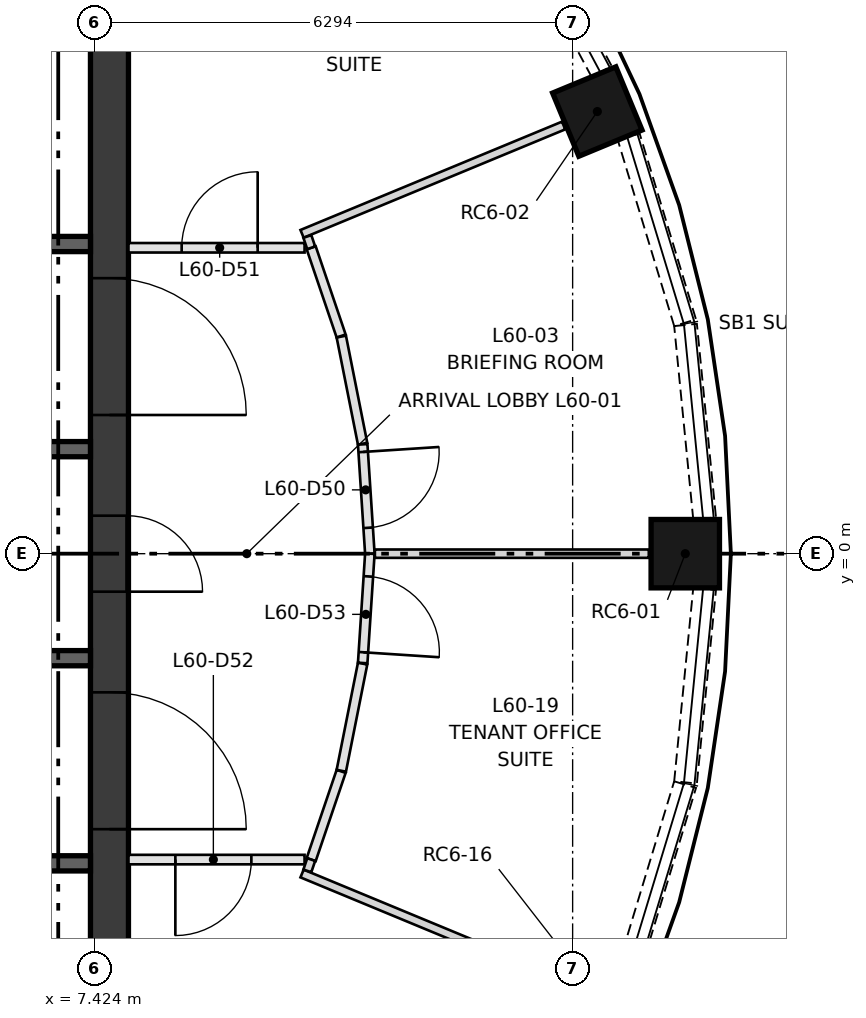
"""IFC4 building model, lengths in metres.
Left out: names, types, materials, properties, quantities, classifications, styles, units other than length and angle.
Written with IfcOpenShell. Run it as: python <this file> out.ifc"""

import sys

from ifc_helpers import new_model, si_unit, direction, frame, frame_2d, origin, origin_2d, place, context, subcontext, project, spatial, rectangle, extrude, element, fill, save


model = new_model("IFC4")
c1 = context("Model", 3, precision=1e-05, world=origin(), true_north=direction((0.0, 1.0)))
c2 = subcontext(c1, "Body", "Model", "MODEL_VIEW")
j1 = project(units=[si_unit("LENGTHUNIT", "METRE"), si_unit("PLANEANGLEUNIT", "RADIAN")], contexts=[c1])
p1 = place(None, origin())
s1 = spatial("IfcSite", under=j1, at=p1, CompositionType="ELEMENT")
p2 = place(p1, origin())
s2 = spatial("IfcBuilding", under=s1, at=p2, CompositionType="ELEMENT")
p3 = place(p2, frame((0.0, 0.0, 221.15)))
s3 = spatial("IfcBuildingStorey", under=s2, at=p3, CompositionType="ELEMENT", Elevation=221.15)
for number, where, z_axis, x_axis in (
    (1, (15.2, 0.0, 0.0), (0.0, 0.0, 1.0), (1.0, 0.0, 0.0)),
    (2, (14.043, 5.817, 0.0), (0.0, 0.0, 1.0), (0.924, 0.383, 0.0)),
):
    element("IfcColumn", number, at=place(p3, frame(where, z_axis=z_axis, x_axis=x_axis)), inside=s3, PredefinedType="COLUMN", context=c2, shape_type="SweptSolid", body=[
        extrude(rectangle(XDim=0.9, YDim=0.9, at=origin_2d()), origin(), (0.0, 0.0, 1.0), 2.85),
    ])
p4 = place(p3, frame((7.624, -7.374, 0.0), z_axis=(0.0, 0.0, 1.0), x_axis=(0.0, 1.0, 0.0)))
e3 = element("IfcWall", 3, at=p4, inside=s3, PredefinedType="SHEAR", context=c2, shape_type="SweptSolid", body=[
    extrude(rectangle(XDim=14.748, YDim=0.5, at=frame_2d((7.374, 0.0))), origin(), (0.0, 0.0, 1.0), 3.35),
])
p5 = place(p4, frame((6.874, 0.0, 0.0)))
e4 = element("IfcOpeningElement", 4, at=p5, cuts=e3, PredefinedType="OPENING", context=c2, shape_type="SweptSolid", body=[
    extrude(rectangle(XDim=1.0, YDim=2.1, at=frame_2d((0.5, 1.05))), frame((0.0, 0.26, 0.0), z_axis=(0.0, -1.0, 0.0), x_axis=(1.0, 0.0, 0.0)), (0.0, 0.0, 1.0), 0.52),
])
p6 = place(p4, frame((3.75, 0.0, 0.0)))
e5 = element("IfcOpeningElement", 5, at=p6, cuts=e3, PredefinedType="OPENING", context=c2, shape_type="SweptSolid", body=[
    extrude(rectangle(XDim=1.8, YDim=2.1, at=frame_2d((0.9, 1.05))), frame((0.0, 0.26, 0.0), z_axis=(0.0, -1.0, 0.0), x_axis=(1.0, 0.0, 0.0)), (0.0, 0.0, 1.0), 0.52),
])
p7 = place(p4, frame((9.198, 0.0, 0.0)))
e6 = element("IfcOpeningElement", 6, at=p7, cuts=e3, PredefinedType="OPENING", context=c2, shape_type="SweptSolid", body=[
    extrude(rectangle(XDim=1.8, YDim=2.1, at=frame_2d((0.9, 1.05))), frame((0.0, 0.26, 0.0), z_axis=(0.0, -1.0, 0.0), x_axis=(1.0, 0.0, 0.0)), (0.0, 0.0, 1.0), 0.52),
])
p8 = place(p3, frame((-7.374, -4.074, 0.0), z_axis=(0.0, 0.0, 1.0), x_axis=(1.0, 0.0, 0.0)))
e7 = element("IfcWall", 7, at=p8, inside=s3, PredefinedType="SHEAR", context=c2, shape_type="SweptSolid", body=[
    extrude(rectangle(XDim=14.748, YDim=0.2, at=frame_2d((7.374, 0.0))), origin(), (0.0, 0.0, 1.0), 3.0),
])
p9 = place(p8, frame((1.319, 0.0, 0.0)))
e8 = element("IfcOpeningElement", 8, at=p9, cuts=e7, PredefinedType="OPENING", context=c2, shape_type="SweptSolid", body=[
    extrude(rectangle(XDim=1.1, YDim=2.1, at=frame_2d((0.55, 1.05))), frame((0.0, 0.11, 0.0), z_axis=(0.0, -1.0, 0.0), x_axis=(1.0, 0.0, 0.0)), (0.0, 0.0, 1.0), 0.22),
])
p10 = place(p8, frame((4.456, 0.0, 0.0)))
e9 = element("IfcOpeningElement", 9, at=p10, cuts=e7, PredefinedType="OPENING", context=c2, shape_type="SweptSolid", body=[
    extrude(rectangle(XDim=1.1, YDim=2.1, at=frame_2d((0.55, 1.05))), frame((0.0, 0.11, 0.0), z_axis=(0.0, -1.0, 0.0), x_axis=(1.0, 0.0, 0.0)), (0.0, 0.0, 1.0), 0.22),
])
p11 = place(p8, frame((8.143, 0.0, 0.0)))
e10 = element("IfcOpeningElement", 10, at=p11, cuts=e7, PredefinedType="OPENING", context=c2, shape_type="SweptSolid", body=[
    extrude(rectangle(XDim=1.0, YDim=2.1, at=frame_2d((0.5, 1.05))), frame((0.0, 0.11, 0.0), z_axis=(0.0, -1.0, 0.0), x_axis=(1.0, 0.0, 0.0)), (0.0, 0.0, 1.0), 0.22),
])
p12 = place(p8, frame((12.379, 0.0, 0.0)))
e11 = element("IfcOpeningElement", 11, at=p12, cuts=e7, PredefinedType="OPENING", context=c2, shape_type="SweptSolid", body=[
    extrude(rectangle(XDim=0.8, YDim=2.1, at=frame_2d((0.4, 1.05))), frame((0.0, 0.11, 0.0), z_axis=(0.0, -1.0, 0.0), x_axis=(1.0, 0.0, 0.0)), (0.0, 0.0, 1.0), 0.22),
])
p13 = place(p3, frame((0.0, 4.074, 0.0), z_axis=(0.0, 0.0, 1.0), x_axis=(1.0, 0.0, 0.0)))
e12 = element("IfcWall", 12, at=p13, inside=s3, PredefinedType="SHEAR", context=c2, shape_type="SweptSolid", body=[
    extrude(rectangle(XDim=7.374, YDim=0.2, at=frame_2d((3.687, 0.0))), origin(), (0.0, 0.0, 1.0), 3.0),
])
p14 = place(p13, frame((0.384, 0.0, 0.0)))
e13 = element("IfcOpeningElement", 13, at=p14, cuts=e12, PredefinedType="OPENING", context=c2, shape_type="SweptSolid", body=[
    extrude(rectangle(XDim=1.0, YDim=2.1, at=frame_2d((0.5, 1.05))), frame((0.0, 0.11, 0.0), z_axis=(0.0, -1.0, 0.0), x_axis=(1.0, 0.0, 0.0)), (0.0, 0.0, 1.0), 0.22),
])
p15 = place(p13, frame((2.153, 0.0, 0.0)))
e14 = element("IfcOpeningElement", 14, at=p15, cuts=e12, PredefinedType="OPENING", context=c2, shape_type="SweptSolid", body=[
    extrude(rectangle(XDim=1.0, YDim=2.1, at=frame_2d((0.5, 1.05))), frame((0.0, 0.11, 0.0), z_axis=(0.0, -1.0, 0.0), x_axis=(1.0, 0.0, 0.0)), (0.0, 0.0, 1.0), 0.22),
])
p16 = place(p13, frame((3.921, 0.0, 0.0)))
e15 = element("IfcOpeningElement", 15, at=p16, cuts=e12, PredefinedType="OPENING", context=c2, shape_type="SweptSolid", body=[
    extrude(rectangle(XDim=1.0, YDim=2.1, at=frame_2d((0.5, 1.05))), frame((0.0, 0.11, 0.0), z_axis=(0.0, -1.0, 0.0), x_axis=(1.0, 0.0, 0.0)), (0.0, 0.0, 1.0), 0.22),
])
p17 = place(p13, frame((5.79, 0.0, 0.0)))
e16 = element("IfcOpeningElement", 16, at=p17, cuts=e12, PredefinedType="OPENING", context=c2, shape_type="SweptSolid", body=[
    extrude(rectangle(XDim=0.8, YDim=2.1, at=frame_2d((0.4, 1.05))), frame((0.0, 0.11, 0.0), z_axis=(0.0, -1.0, 0.0), x_axis=(1.0, 0.0, 0.0)), (0.0, 0.0, 1.0), 0.22),
])
for number, where, z_axis, x_axis in (
    (17, (4.374, -1.375, 0.0), (0.0, 0.0, 1.0), (1.0, 0.0, 0.0)),
    (18, (4.374, 1.375, 0.0), (0.0, 0.0, 1.0), (1.0, 0.0, 0.0)),
):
    element("IfcWall", number, at=place(p3, frame(where, z_axis=z_axis, x_axis=x_axis)), inside=s3, PredefinedType="SHEAR", context=c2, shape_type="SweptSolid", body=[
        extrude(rectangle(XDim=3.0, YDim=0.2, at=frame_2d((1.5, 0.0))), origin(), (0.0, 0.0, 1.0), 3.0),
    ])
p18 = place(p3, frame((15.455, 0.464, 0.0), z_axis=(0.0, 0.0, 1.0), x_axis=(-0.09813315545, 0.995173293352, 0.0)))
e19 = element("IfcWall", 19, at=p18, inside=s3, PredefinedType="SOLIDWALL", context=c2, shape_type="SweptSolid", body=[
    extrude(rectangle(XDim=2.558, YDim=0.3, at=frame_2d((1.279, 0.0))), origin(), (0.0, 0.0, 1.0), 0.9),
])
p19 = place(p3, frame((15.198, 3.038, 0.0), z_axis=(0.0, 0.0, 1.0), x_axis=(-0.290219358397, 0.956960147557, 0.0)))
e20 = element("IfcWall", 20, at=p19, inside=s3, PredefinedType="SOLIDWALL", context=c2, shape_type="SweptSolid", body=[
    extrude(rectangle(XDim=2.557, YDim=0.3, at=frame_2d((1.279, 0.0))), origin(), (0.0, 0.0, 1.0), 0.9),
])
p20 = place(p3, frame((14.1, 6.343, 0.0), z_axis=(0.0, 0.0, 1.0), x_axis=(-0.471603904468, 0.881810499649, 0.0)))
e21 = element("IfcWall", 21, at=p20, inside=s3, PredefinedType="SOLIDWALL", context=c2, shape_type="SweptSolid", body=[
    extrude(rectangle(XDim=2.557, YDim=0.3, at=frame_2d((1.278, 0.0))), origin(), (0.0, 0.0, 1.0), 0.9),
])
p21 = place(p3, frame((14.455, -5.486, 0.0), z_axis=(0.0, 0.0, 1.0), x_axis=(0.290219358397, 0.956960147557, 0.0)))
e22 = element("IfcWall", 22, at=p21, inside=s3, PredefinedType="SOLIDWALL", context=c2, shape_type="SweptSolid", body=[
    extrude(rectangle(XDim=2.557, YDim=0.3, at=frame_2d((1.279, 0.0))), origin(), (0.0, 0.0, 1.0), 0.9),
])
p22 = place(p3, frame((15.204, -3.009, 0.0), z_axis=(0.0, 0.0, 1.0), x_axis=(0.09813315545, 0.995173293352, 0.0)))
e23 = element("IfcWall", 23, at=p22, inside=s3, PredefinedType="SOLIDWALL", context=c2, shape_type="SweptSolid", body=[
    extrude(rectangle(XDim=2.558, YDim=0.3, at=frame_2d((1.279, 0.0))), origin(), (0.0, 0.0, 1.0), 0.9),
])
p23 = place(p3, frame((10.278, 4.024, 0.0), z_axis=(0.0, 0.0, 1.0), x_axis=(0.321363343769, -0.946955965862, 0.0)))
e24 = element("IfcWall", 24, at=p23, inside=s3, PredefinedType="PARTITIONING", context=c2, shape_type="SweptSolid", body=[
    extrude(rectangle(XDim=1.225, YDim=0.125, at=frame_2d((0.613, 0.0))), origin(), (0.0, 0.0, 1.0), 3.0),
])
p24 = place(p3, frame((10.674, 2.856, 0.0), z_axis=(0.0, 0.0, 1.0), x_axis=(0.195005351681, -0.980802178228, 0.0)))
e25 = element("IfcWall", 25, at=p24, inside=s3, PredefinedType="PARTITIONING", context=c2, shape_type="SweptSolid", body=[
    extrude(rectangle(XDim=1.437, YDim=0.125, at=frame_2d((0.719, 0.0))), origin(), (0.0, 0.0, 1.0), 3.0),
])
p25 = place(p3, frame((10.956, 1.438, 0.0), z_axis=(0.0, 0.0, 1.0), x_axis=(0.065383473363, -0.997860211358, 0.0)))
e26 = element("IfcWall", 26, at=p25, inside=s3, PredefinedType="PARTITIONING", context=c2, shape_type="SweptSolid", body=[
    extrude(rectangle(XDim=1.441, YDim=0.125, at=frame_2d((0.721, 0.0))), origin(), (0.0, 0.0, 1.0), 3.0),
])
p26 = place(p25, frame((0.1, 0.0, 0.0)))
e27 = element("IfcOpeningElement", 27, at=p26, cuts=e26, PredefinedType="OPENING", context=c2, shape_type="SweptSolid", body=[
    extrude(rectangle(XDim=1.0, YDim=2.1, at=frame_2d((0.5, 1.05))), frame((0.0, 0.073, 0.0), z_axis=(0.0, -1.0, 0.0), x_axis=(1.0, 0.0, 0.0)), (0.0, 0.0, 1.0), 0.145),
])
p27 = place(p3, frame((7.874, 4.024, 0.0), z_axis=(0.0, 0.0, 1.0), x_axis=(1.0, 0.0, 0.0)))
e28 = element("IfcWall", 28, at=p27, inside=s3, PredefinedType="PARTITIONING", context=c2, shape_type="SweptSolid", body=[
    extrude(rectangle(XDim=2.317, YDim=0.125, at=frame_2d((1.158, 0.0))), origin(), (0.0, 0.0, 1.0), 3.0),
])
p28 = place(p27, frame((0.7, 0.0, 0.0)))
e29 = element("IfcOpeningElement", 29, at=p28, cuts=e28, PredefinedType="OPENING", context=c2, shape_type="SweptSolid", body=[
    extrude(rectangle(XDim=1.0, YDim=2.1, at=frame_2d((0.5, 1.05))), frame((0.0, 0.073, 0.0), z_axis=(0.0, -1.0, 0.0), x_axis=(1.0, 0.0, 0.0)), (0.0, 0.0, 1.0), 0.145),
])
p29 = place(p3, frame((10.191, -4.024, 0.0), z_axis=(0.0, 0.0, 1.0), x_axis=(-1.0, 0.0, 0.0)))
e30 = element("IfcWall", 30, at=p29, inside=s3, PredefinedType="PARTITIONING", context=c2, shape_type="SweptSolid", body=[
    extrude(rectangle(XDim=2.317, YDim=0.125, at=frame_2d((1.158, 0.0))), origin(), (0.0, 0.0, 1.0), 3.0),
])
p30 = place(p29, frame((0.7, 0.0, 0.0)))
e31 = element("IfcOpeningElement", 31, at=p30, cuts=e30, PredefinedType="OPENING", context=c2, shape_type="SweptSolid", body=[
    extrude(rectangle(XDim=1.0, YDim=2.1, at=frame_2d((0.5, 1.05))), frame((0.0, 0.073, 0.0), z_axis=(0.0, -1.0, 0.0), x_axis=(1.0, 0.0, 0.0)), (0.0, 0.0, 1.0), 0.145),
])
p31 = place(p3, frame((10.672, -2.864, 0.0), z_axis=(0.0, 0.0, 1.0), x_axis=(-0.321363343769, -0.946955965862, 0.0)))
e32 = element("IfcWall", 32, at=p31, inside=s3, PredefinedType="PARTITIONING", context=c2, shape_type="SweptSolid", body=[
    extrude(rectangle(XDim=1.225, YDim=0.125, at=frame_2d((0.613, 0.0))), origin(), (0.0, 0.0, 1.0), 3.0),
])
p32 = place(p3, frame((10.955, -1.446, 0.0), z_axis=(0.0, 0.0, 1.0), x_axis=(-0.195005351681, -0.980802178228, 0.0)))
e33 = element("IfcWall", 33, at=p32, inside=s3, PredefinedType="PARTITIONING", context=c2, shape_type="SweptSolid", body=[
    extrude(rectangle(XDim=1.437, YDim=0.125, at=frame_2d((0.719, 0.0))), origin(), (0.0, 0.0, 1.0), 3.0),
])
p33 = place(p3, frame((11.05, 0.0, 0.0), z_axis=(0.0, 0.0, 1.0), x_axis=(-0.065383473363, -0.997860211358, 0.0)))
e34 = element("IfcWall", 34, at=p33, inside=s3, PredefinedType="PARTITIONING", context=c2, shape_type="SweptSolid", body=[
    extrude(rectangle(XDim=1.441, YDim=0.125, at=frame_2d((0.721, 0.0))), origin(), (0.0, 0.0, 1.0), 3.0),
])
p34 = place(p33, frame((0.3, 0.0, 0.0)))
e35 = element("IfcOpeningElement", 35, at=p34, cuts=e34, PredefinedType="OPENING", context=c2, shape_type="SweptSolid", body=[
    extrude(rectangle(XDim=1.0, YDim=2.1, at=frame_2d((0.5, 1.05))), frame((0.0, 0.073, 0.0), z_axis=(0.0, -1.0, 0.0), x_axis=(1.0, 0.0, 0.0)), (0.0, 0.0, 1.0), 0.145),
])
p35 = place(p3, frame((10.158, 4.208, 0.0), z_axis=(0.0, 0.0, 1.0), x_axis=(0.923897012701, 0.382641228728, 0.0)))
e36 = element("IfcWall", 36, at=p35, inside=s3, PredefinedType="PARTITIONING", context=c2, shape_type="SweptSolid", body=[
    extrude(rectangle(XDim=3.725, YDim=0.11, at=frame_2d((1.862, 0.0))), origin(), (0.0, 0.0, 1.0), 3.0),
])
p36 = place(p3, frame((10.278, 4.024, 0.0), z_axis=(0.0, 0.0, 1.0), x_axis=(-0.321819116975, 0.94680117023, 0.0)))
e37 = element("IfcWall", 37, at=p36, inside=s3, PredefinedType="PARTITIONING", context=c2, shape_type="SweptSolid", body=[
    extrude(rectangle(XDim=0.157, YDim=0.11, at=frame_2d((0.079, 0.0))), origin(), (0.0, 0.0, 1.0), 3.0),
])
p37 = place(p3, frame((14.72, 0.0, 0.0), z_axis=(0.0, 0.0, 1.0), x_axis=(-1.0, 0.0, 0.0)))
e38 = element("IfcWall", 38, at=p37, inside=s3, PredefinedType="PARTITIONING", context=c2, shape_type="SweptSolid", body=[
    extrude(rectangle(XDim=3.604, YDim=0.11, at=frame_2d((1.802, 0.0))), origin(), (0.0, 0.0, 1.0), 3.0),
])
p38 = place(p3, frame((10.158, -4.208, 0.0), z_axis=(0.0, 0.0, 1.0), x_axis=(0.923897012701, -0.382641228728, 0.0)))
e39 = element("IfcWall", 39, at=p38, inside=s3, PredefinedType="PARTITIONING", context=c2, shape_type="SweptSolid", body=[
    extrude(rectangle(XDim=3.725, YDim=0.11, at=frame_2d((1.862, 0.0))), origin(), (0.0, 0.0, 1.0), 3.0),
])
p39 = place(p3, frame((10.278, -4.024, 0.0), z_axis=(0.0, 0.0, 1.0), x_axis=(-0.321819116975, -0.94680117023, 0.0)))
e40 = element("IfcWall", 40, at=p39, inside=s3, PredefinedType="PARTITIONING", context=c2, shape_type="SweptSolid", body=[
    extrude(rectangle(XDim=0.157, YDim=0.11, at=frame_2d((0.079, 0.0))), origin(), (0.0, 0.0, 1.0), 3.0),
])
p40 = place(p5, frame((1.0, 0.0, 0.0), z_axis=(0.0, 0.0, 1.0), x_axis=(-1.0, 0.0, 0.0)))
e41 = element("IfcDoor", 41, at=p40, inside=s3, OperationType="SINGLE_SWING_LEFT", PredefinedType="DOOR", context=c2, shape_type="SweptSolid", body=[
    extrude(rectangle(XDim=1.0, YDim=2.1, at=frame_2d((0.5, 1.05))), frame((0.0, 0.25, 0.0), z_axis=(0.0, -1.0, 0.0), x_axis=(1.0, 0.0, 0.0)), (0.0, 0.0, 1.0), 0.05),
])
fill(e4, e41)
p41 = place(p6, frame((1.8, 0.0, 0.0), z_axis=(0.0, 0.0, 1.0), x_axis=(-1.0, 0.0, 0.0)))
e42 = element("IfcDoor", 42, at=p41, inside=s3, OperationType="DOUBLE_DOOR_SINGLE_SWING", PredefinedType="DOOR", context=c2, shape_type="SweptSolid", body=[
    extrude(rectangle(XDim=1.8, YDim=2.1, at=frame_2d((0.9, 1.05))), frame((0.0, 0.025, 0.0), z_axis=(0.0, -1.0, 0.0), x_axis=(1.0, 0.0, 0.0)), (0.0, 0.0, 1.0), 0.05),
])
fill(e5, e42)
p42 = place(p7, frame((1.8, 0.0, 0.0), z_axis=(0.0, 0.0, 1.0), x_axis=(-1.0, 0.0, 0.0)))
e43 = element("IfcDoor", 43, at=p42, inside=s3, OperationType="DOUBLE_DOOR_SINGLE_SWING", PredefinedType="DOOR", context=c2, shape_type="SweptSolid", body=[
    extrude(rectangle(XDim=1.8, YDim=2.1, at=frame_2d((0.9, 1.05))), frame((0.0, 0.025, 0.0), z_axis=(0.0, -1.0, 0.0), x_axis=(1.0, 0.0, 0.0)), (0.0, 0.0, 1.0), 0.05),
])
fill(e6, e43)
p43 = place(p26, origin())
e44 = element("IfcDoor", 44, at=p43, inside=s3, OperationType="SINGLE_SWING_LEFT", PredefinedType="DOOR", context=c2, shape_type="SweptSolid", body=[
    extrude(rectangle(XDim=1.0, YDim=2.1, at=frame_2d((0.5, 1.05))), frame((0.0, 0.025, 0.0), z_axis=(0.0, -1.0, 0.0), x_axis=(1.0, 0.0, 0.0)), (0.0, 0.0, 1.0), 0.05),
])
fill(e27, e44)
p44 = place(p28, origin())
e45 = element("IfcDoor", 45, at=p44, inside=s3, OperationType="SINGLE_SWING_RIGHT", PredefinedType="DOOR", context=c2, shape_type="SweptSolid", body=[
    extrude(rectangle(XDim=1.0, YDim=2.1, at=frame_2d((0.5, 1.05))), frame((0.0, 0.025, 0.0), z_axis=(0.0, -1.0, 0.0), x_axis=(1.0, 0.0, 0.0)), (0.0, 0.0, 1.0), 0.05),
])
fill(e29, e45)
p45 = place(p30, origin())
e46 = element("IfcDoor", 46, at=p45, inside=s3, OperationType="SINGLE_SWING_RIGHT", PredefinedType="DOOR", context=c2, shape_type="SweptSolid", body=[
    extrude(rectangle(XDim=1.0, YDim=2.1, at=frame_2d((0.5, 1.05))), frame((0.0, 0.025, 0.0), z_axis=(0.0, -1.0, 0.0), x_axis=(1.0, 0.0, 0.0)), (0.0, 0.0, 1.0), 0.05),
])
fill(e31, e46)
p46 = place(p34, origin())
e47 = element("IfcDoor", 47, at=p46, inside=s3, OperationType="SINGLE_SWING_RIGHT", PredefinedType="DOOR", context=c2, shape_type="SweptSolid", body=[
    extrude(rectangle(XDim=1.0, YDim=2.1, at=frame_2d((0.5, 1.05))), frame((0.0, 0.025, 0.0), z_axis=(0.0, -1.0, 0.0), x_axis=(1.0, 0.0, 0.0)), (0.0, 0.0, 1.0), 0.05),
])
fill(e35, e47)
save(model, sys.argv[1])
